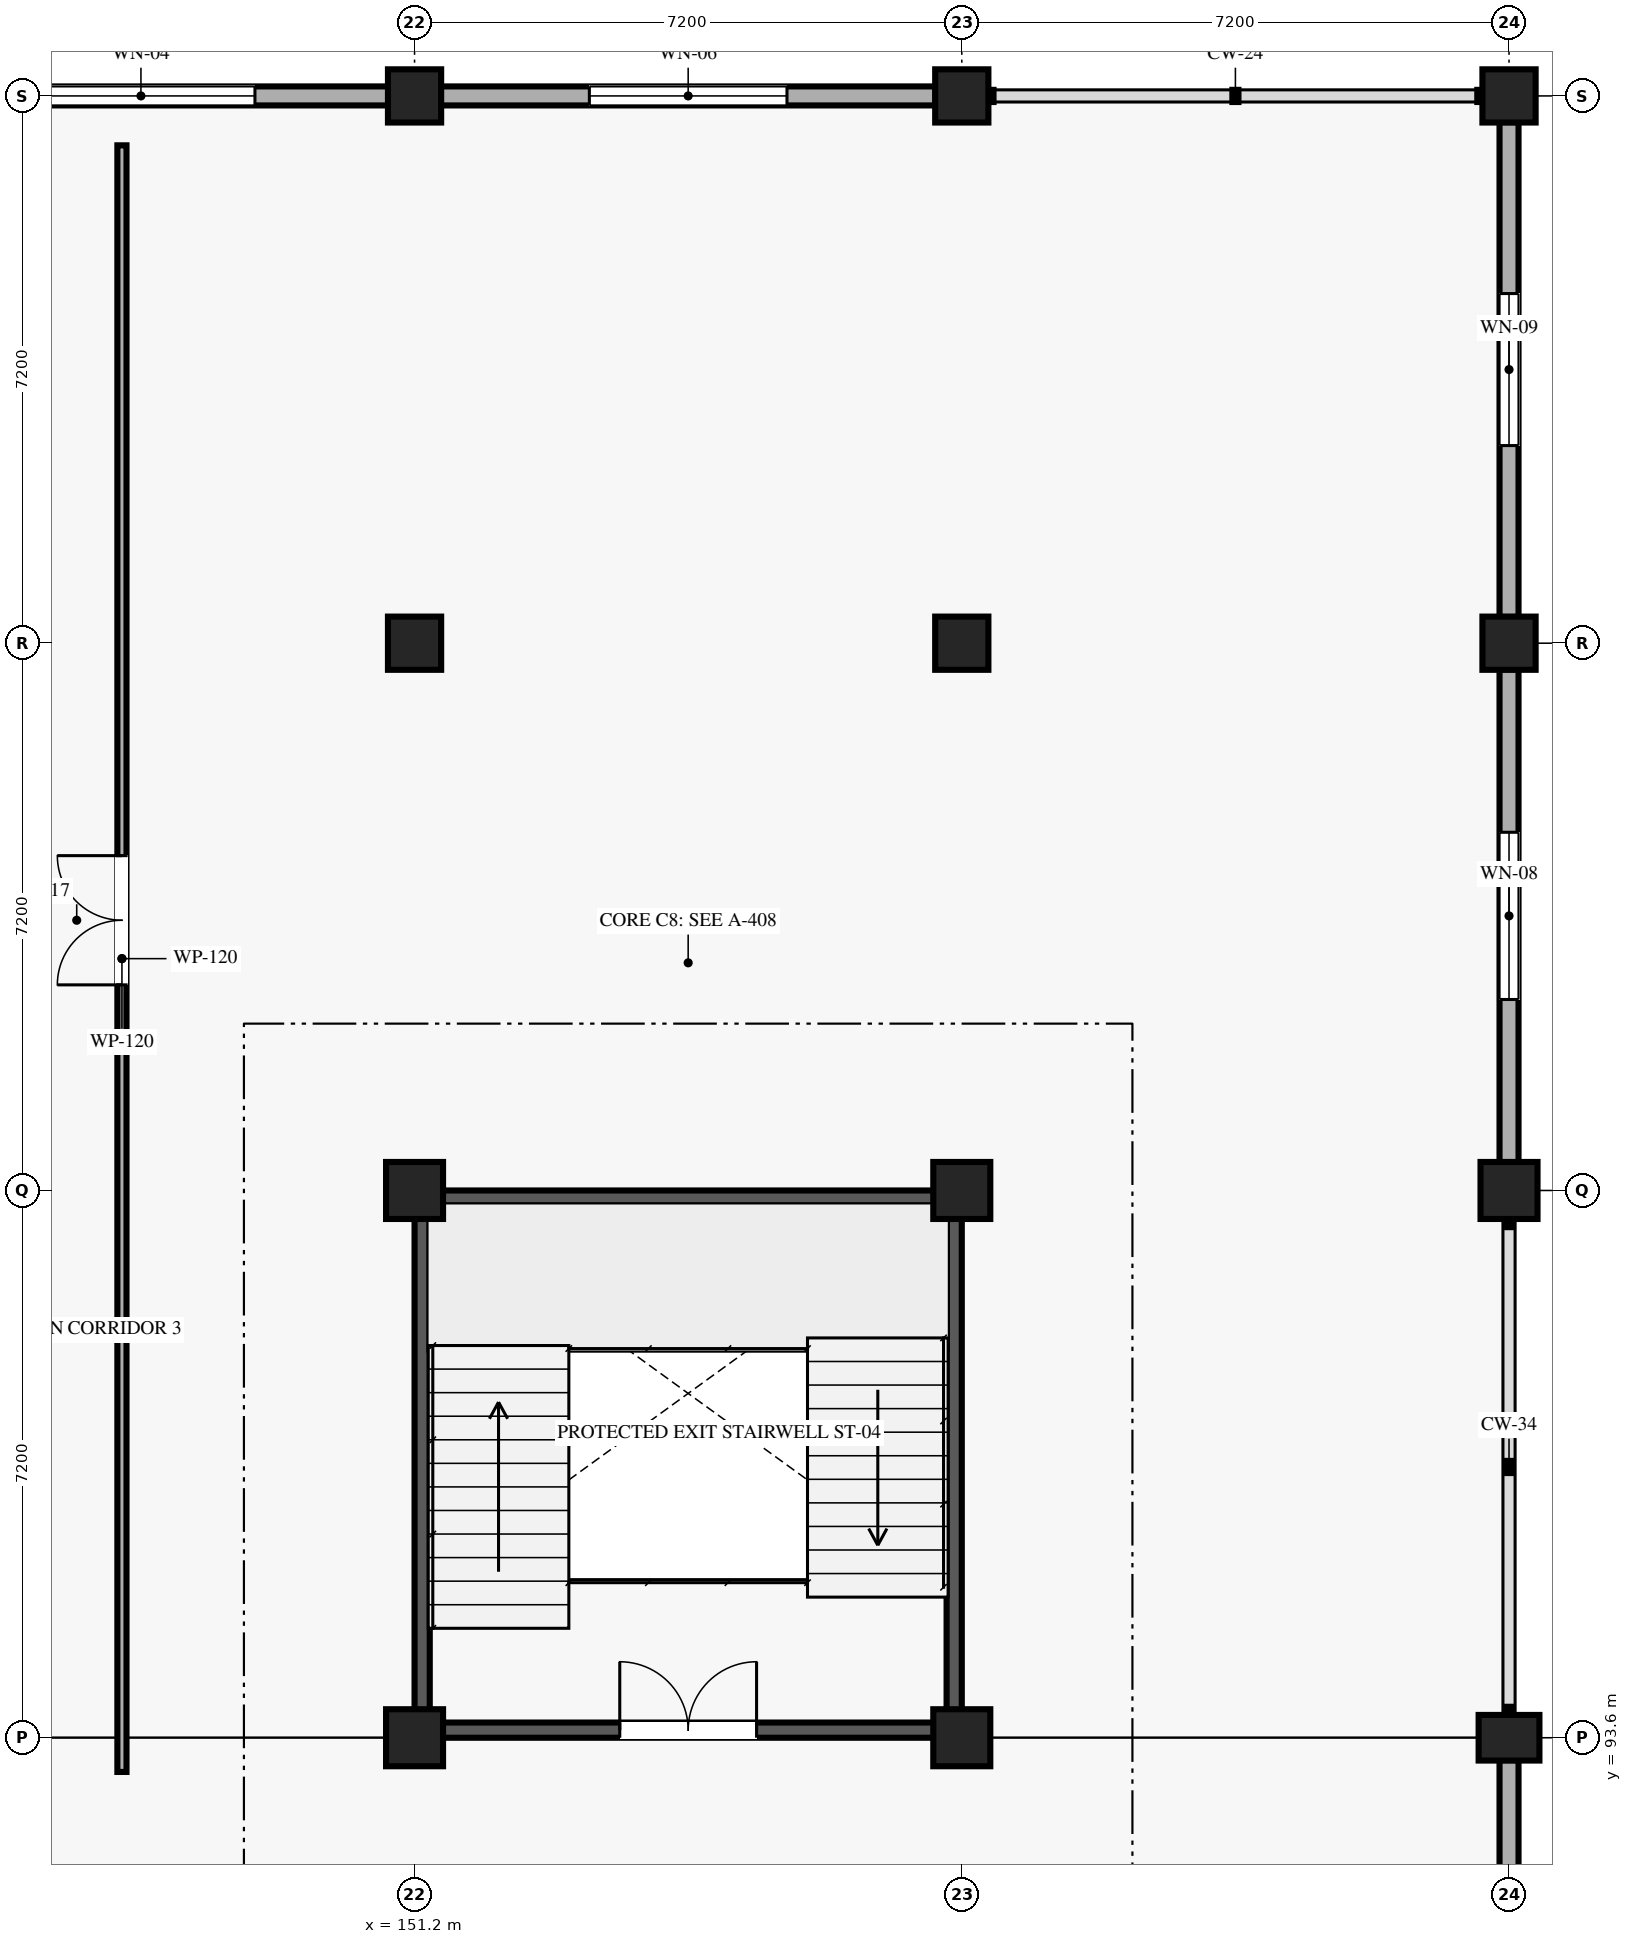
"""IFC4 building model, lengths in metres.
Left out: names, types, materials, properties, quantities, classifications, styles, units other than length and angle.
Written with IfcOpenShell. Run it as: python <this file> out.ifc"""

import sys

from ifc_helpers import new_model, si_unit, direction, frame, frame_2d, origin, origin_2d, place, context, subcontext, project, spatial, rectangle, extrude, element, fill, save


model = new_model("IFC4")
c1 = context("Model", 3, precision=1e-05, world=origin(), true_north=direction((0.0, 1.0)))
c2 = subcontext(c1, "Body", "Model", "MODEL_VIEW")
j1 = project(units=[si_unit("LENGTHUNIT", "METRE"), si_unit("PLANEANGLEUNIT", "RADIAN")], contexts=[c1])
p1 = place(None, origin())
s1 = spatial("IfcSite", under=j1, at=p1, CompositionType="ELEMENT")
p2 = place(p1, origin())
s2 = spatial("IfcBuilding", under=s1, at=p2, CompositionType="ELEMENT")
p3 = place(p2, frame((0.0, 0.0, 9.45)))
s3 = spatial("IfcBuildingStorey", under=s2, at=p3, CompositionType="ELEMENT", Elevation=9.45)
for number, where, z_axis, x_axis in (
    (1, (151.2, 93.6, 0.0), (0.0, 0.0, 1.0), (1.0, 0.0, 0.0)),
    (2, (151.2, 100.8, 0.0), (0.0, 0.0, 1.0), (1.0, 0.0, 0.0)),
):
    element("IfcColumn", number, at=place(p3, frame(where, z_axis=z_axis, x_axis=x_axis)), inside=s3, PredefinedType="COLUMN", context=c2, shape_type="SweptSolid", body=[
        extrude(rectangle(XDim=0.75, YDim=0.75, at=origin_2d()), origin(), (0.0, 0.0, 1.0), 4.05),
    ])
for number, where, z_axis, x_axis in (
    (3, (151.2, 108.0, 0.0), (0.0, 0.0, 1.0), (1.0, 0.0, 0.0)),
    (4, (151.2, 115.2, 0.0), (0.0, 0.0, 1.0), (1.0, 0.0, 0.0)),
):
    element("IfcColumn", number, at=place(p3, frame(where, z_axis=z_axis, x_axis=x_axis)), inside=s3, PredefinedType="COLUMN", context=c2, shape_type="SweptSolid", body=[
        extrude(rectangle(XDim=0.7, YDim=0.7, at=origin_2d()), origin(), (0.0, 0.0, 1.0), 4.05),
    ])
for number, where, z_axis, x_axis in (
    (5, (158.4, 93.6, 0.0), (0.0, 0.0, 1.0), (1.0, 0.0, 0.0)),
    (6, (158.4, 100.8, 0.0), (0.0, 0.0, 1.0), (1.0, 0.0, 0.0)),
):
    element("IfcColumn", number, at=place(p3, frame(where, z_axis=z_axis, x_axis=x_axis)), inside=s3, PredefinedType="COLUMN", context=c2, shape_type="SweptSolid", body=[
        extrude(rectangle(XDim=0.75, YDim=0.75, at=origin_2d()), origin(), (0.0, 0.0, 1.0), 4.05),
    ])
for number, where, z_axis, x_axis in (
    (7, (158.4, 108.0, 0.0), (0.0, 0.0, 1.0), (1.0, 0.0, 0.0)),
    (8, (158.4, 115.2, 0.0), (0.0, 0.0, 1.0), (1.0, 0.0, 0.0)),
):
    element("IfcColumn", number, at=place(p3, frame(where, z_axis=z_axis, x_axis=x_axis)), inside=s3, PredefinedType="COLUMN", context=c2, shape_type="SweptSolid", body=[
        extrude(rectangle(XDim=0.7, YDim=0.7, at=origin_2d()), origin(), (0.0, 0.0, 1.0), 4.05),
    ])
p4 = place(p3, frame((165.6, 93.6, 0.0), z_axis=(0.0, 0.0, 1.0), x_axis=(0.0, 1.0, 0.0)))
e9 = element("IfcColumn", 9, at=p4, inside=s3, PredefinedType="COLUMN", context=c2, shape_type="SweptSolid", body=[
    extrude(rectangle(XDim=0.6, YDim=0.8, at=origin_2d()), origin(), (0.0, 0.0, 1.0), 4.05),
])
p5 = place(p3, frame((165.6, 100.8, 0.0), z_axis=(0.0, 0.0, 1.0), x_axis=(1.0, 0.0, 0.0)))
e10 = element("IfcColumn", 10, at=p5, inside=s3, PredefinedType="COLUMN", context=c2, shape_type="SweptSolid", body=[
    extrude(rectangle(XDim=0.75, YDim=0.75, at=origin_2d()), origin(), (0.0, 0.0, 1.0), 4.05),
])
for number, where, z_axis, x_axis in (
    (11, (165.6, 108.0, 0.0), (0.0, 0.0, 1.0), (1.0, 0.0, 0.0)),
    (12, (165.6, 115.2, 0.0), (0.0, 0.0, 1.0), (1.0, 0.0, 0.0)),
):
    element("IfcColumn", number, at=place(p3, frame(where, z_axis=z_axis, x_axis=x_axis)), inside=s3, PredefinedType="COLUMN", context=c2, shape_type="SweptSolid", body=[
        extrude(rectangle(XDim=0.7, YDim=0.7, at=origin_2d()), origin(), (0.0, 0.0, 1.0), 4.05),
    ])
p6 = place(p3, frame((144.345, 115.2, 0.0), z_axis=(0.0, 0.0, 1.0), x_axis=(1.0, 0.0, 0.0)))
e13 = element("IfcWall", 13, at=p6, inside=s3, PredefinedType="SOLIDWALL", context=c2, shape_type="SweptSolid", body=[
    extrude(rectangle(XDim=6.51, YDim=0.25, at=frame_2d((3.255, 0.0))), origin(), (0.0, 0.0, 1.0), 3.195),
])
p7 = place(p6, frame((1.755, 0.0, 0.85)))
e14 = element("IfcOpeningElement", 14, at=p7, cuts=e13, PredefinedType="OPENING", context=c2, shape_type="SweptSolid", body=[
    extrude(rectangle(XDim=3.0, YDim=1.9, at=frame_2d((1.5, 0.95))), frame((0.0, 0.135, 0.0), z_axis=(0.0, -1.0, 0.0), x_axis=(1.0, 0.0, 0.0)), (0.0, 0.0, 1.0), 0.27),
])
p8 = place(p3, frame((151.545, 115.2, 0.0), z_axis=(0.0, 0.0, 1.0), x_axis=(1.0, 0.0, 0.0)))
e15 = element("IfcWall", 15, at=p8, inside=s3, PredefinedType="SOLIDWALL", context=c2, shape_type="SweptSolid", body=[
    extrude(rectangle(XDim=6.51, YDim=0.25, at=frame_2d((3.255, 0.0))), origin(), (0.0, 0.0, 1.0), 3.195),
])
p9 = place(p8, frame((1.955, 0.0, 0.85)))
e16 = element("IfcOpeningElement", 16, at=p9, cuts=e15, PredefinedType="OPENING", context=c2, shape_type="SweptSolid", body=[
    extrude(rectangle(XDim=2.6, YDim=1.8, at=frame_2d((1.3, 0.9))), frame((0.0, 0.135, 0.0), z_axis=(0.0, -1.0, 0.0), x_axis=(1.0, 0.0, 0.0)), (0.0, 0.0, 1.0), 0.27),
])
p10 = place(p3, frame((165.6, 86.695, 0.0), z_axis=(0.0, 0.0, 1.0), x_axis=(0.0, 1.0, 0.0)))
e17 = element("IfcWall", 17, at=p10, inside=s3, PredefinedType="SOLIDWALL", context=c2, shape_type="SweptSolid", body=[
    extrude(rectangle(XDim=6.61, YDim=0.25, at=frame_2d((3.305, 0.0))), origin(), (0.0, 0.0, 1.0), 3.195),
])
p11 = place(p10, frame((2.005, 0.0, 0.85)))
e18 = element("IfcOpeningElement", 18, at=p11, cuts=e17, PredefinedType="OPENING", context=c2, shape_type="SweptSolid", body=[
    extrude(rectangle(XDim=2.6, YDim=1.8, at=frame_2d((1.3, 0.9))), frame((0.0, 0.135, 0.0), z_axis=(0.0, -1.0, 0.0), x_axis=(1.0, 0.0, 0.0)), (0.0, 0.0, 1.0), 0.27),
])
p12 = place(p3, frame((165.6, 101.17, 0.0), z_axis=(0.0, 0.0, 1.0), x_axis=(0.0, 1.0, 0.0)))
e19 = element("IfcWall", 19, at=p12, inside=s3, PredefinedType="SOLIDWALL", context=c2, shape_type="SweptSolid", body=[
    extrude(rectangle(XDim=6.485, YDim=0.25, at=frame_2d((3.243, 0.0))), origin(), (0.0, 0.0, 1.0), 3.195),
])
p13 = place(p12, frame((2.143, 0.0, 0.85)))
e20 = element("IfcOpeningElement", 20, at=p13, cuts=e19, PredefinedType="OPENING", context=c2, shape_type="SweptSolid", body=[
    extrude(rectangle(XDim=2.2, YDim=1.7, at=frame_2d((1.1, 0.85))), frame((0.0, 0.135, 0.0), z_axis=(0.0, -1.0, 0.0), x_axis=(1.0, 0.0, 0.0)), (0.0, 0.0, 1.0), 0.27),
])
p14 = place(p3, frame((165.6, 108.345, 0.0), z_axis=(0.0, 0.0, 1.0), x_axis=(0.0, 1.0, 0.0)))
e21 = element("IfcWall", 21, at=p14, inside=s3, PredefinedType="SOLIDWALL", context=c2, shape_type="SweptSolid", body=[
    extrude(rectangle(XDim=6.51, YDim=0.25, at=frame_2d((3.255, 0.0))), origin(), (0.0, 0.0, 1.0), 3.195),
])
p15 = place(p14, frame((2.255, 0.0, 0.85)))
e22 = element("IfcOpeningElement", 22, at=p15, cuts=e21, PredefinedType="OPENING", context=c2, shape_type="SweptSolid", body=[
    extrude(rectangle(XDim=2.0, YDim=1.65, at=frame_2d((1.0, 0.825))), frame((0.0, 0.135, 0.0), z_axis=(0.0, -1.0, 0.0), x_axis=(1.0, 0.0, 0.0)), (0.0, 0.0, 1.0), 0.27),
])
p16 = place(p3, frame((151.4, 93.7, 0.0), z_axis=(0.0, 0.0, 1.0), x_axis=(1.0, 0.0, 0.0)))
e23 = element("IfcWall", 23, at=p16, inside=s3, PredefinedType="SHEAR", context=c2, shape_type="SweptSolid", body=[
    extrude(rectangle(XDim=6.8, YDim=0.2, at=frame_2d((3.4, 0.0))), origin(), (0.0, 0.0, 1.0), 3.81),
])
p17 = place(p16, frame((2.5, 0.0, 0.0)))
e24 = element("IfcOpeningElement", 24, at=p17, cuts=e23, PredefinedType="OPENING", context=c2, shape_type="SweptSolid", body=[
    extrude(rectangle(XDim=1.8, YDim=2.2, at=frame_2d((0.9, 1.1))), frame((0.0, 0.11, 0.0), z_axis=(0.0, -1.0, 0.0), x_axis=(1.0, 0.0, 0.0)), (0.0, 0.0, 1.0), 0.22),
])
for number, where, z_axis, x_axis in (
    (25, (151.4, 100.7, 0.0), (0.0, 0.0, 1.0), (1.0, 0.0, 0.0)),
    (26, (151.3, 93.8, 0.0), (0.0, 0.0, 1.0), (0.0, 1.0, 0.0)),
    (27, (158.3, 93.8, 0.0), (0.0, 0.0, 1.0), (0.0, 1.0, 0.0)),
):
    element("IfcWall", number, at=place(p3, frame(where, z_axis=z_axis, x_axis=x_axis)), inside=s3, PredefinedType="SHEAR", context=c2, shape_type="SweptSolid", body=[
        extrude(rectangle(XDim=6.8, YDim=0.2, at=frame_2d((3.4, 0.0))), origin(), (0.0, 0.0, 1.0), 3.81),
    ])
p18 = place(p3, frame((147.35, 93.15, 0.0), z_axis=(0.0, 0.0, 1.0), x_axis=(0.0, 1.0, 0.0)))
e28 = element("IfcWall", 28, at=p18, inside=s3, PredefinedType="PARTITIONING", context=c2, shape_type="SweptSolid", body=[
    extrude(rectangle(XDim=21.4, YDim=0.12, at=frame_2d((10.7, 0.0))), origin(), (0.0, 0.0, 1.0), 3.81),
])
p19 = place(p18, frame((10.355, 0.0, 0.0)))
e29 = element("IfcOpeningElement", 29, at=p19, cuts=e28, PredefinedType="OPENING", context=c2, shape_type="SweptSolid", body=[
    extrude(rectangle(XDim=1.7, YDim=2.2, at=frame_2d((0.85, 1.1))), frame((0.0, 0.07, 0.0), z_axis=(0.0, -1.0, 0.0), x_axis=(1.0, 0.0, 0.0)), (0.0, 0.0, 1.0), 0.14),
])
p20 = place(p7, origin())
e30 = element("IfcWindow", 30, at=p20, inside=s3, PartitioningType="SINGLE_PANEL", PredefinedType="WINDOW", context=c2, shape_type="SweptSolid", body=[
    extrude(rectangle(XDim=3.0, YDim=1.9, at=frame_2d((1.5, 0.95))), frame((0.0, 0.03, 0.0), z_axis=(0.0, -1.0, 0.0), x_axis=(1.0, 0.0, 0.0)), (0.0, 0.0, 1.0), 0.06),
])
fill(e14, e30)
p21 = place(p9, origin())
e31 = element("IfcWindow", 31, at=p21, inside=s3, PartitioningType="SINGLE_PANEL", PredefinedType="WINDOW", context=c2, shape_type="SweptSolid", body=[
    extrude(rectangle(XDim=2.6, YDim=1.8, at=frame_2d((1.3, 0.9))), frame((0.0, 0.03, 0.0), z_axis=(0.0, -1.0, 0.0), x_axis=(1.0, 0.0, 0.0)), (0.0, 0.0, 1.0), 0.06),
])
fill(e16, e31)
p22 = place(p13, origin())
e32 = element("IfcWindow", 32, at=p22, inside=s3, PartitioningType="SINGLE_PANEL", PredefinedType="WINDOW", context=c2, shape_type="SweptSolid", body=[
    extrude(rectangle(XDim=2.2, YDim=1.7, at=frame_2d((1.1, 0.85))), frame((0.0, 0.03, 0.0), z_axis=(0.0, -1.0, 0.0), x_axis=(1.0, 0.0, 0.0)), (0.0, 0.0, 1.0), 0.06),
])
fill(e20, e32)
p23 = place(p15, origin())
e33 = element("IfcWindow", 33, at=p23, inside=s3, PartitioningType="SINGLE_PANEL", PredefinedType="WINDOW", context=c2, shape_type="SweptSolid", body=[
    extrude(rectangle(XDim=2.0, YDim=1.65, at=frame_2d((1.0, 0.825))), frame((0.0, 0.03, 0.0), z_axis=(0.0, -1.0, 0.0), x_axis=(1.0, 0.0, 0.0)), (0.0, 0.0, 1.0), 0.06),
])
fill(e22, e33)
p24 = place(p17, origin())
e34 = element("IfcDoor", 34, at=p24, inside=s3, OperationType="DOUBLE_DOOR_SINGLE_SWING", PredefinedType="DOOR", context=c2, shape_type="SweptSolid", body=[
    extrude(rectangle(XDim=1.8, YDim=2.2, at=frame_2d((0.9, 1.1))), frame((0.0, 0.025, 0.0), z_axis=(0.0, -1.0, 0.0), x_axis=(1.0, 0.0, 0.0)), (0.0, 0.0, 1.0), 0.05),
])
fill(e24, e34)
p25 = place(p19, origin())
e35 = element("IfcDoor", 35, at=p25, inside=s3, OperationType="DOUBLE_DOOR_SINGLE_SWING", PredefinedType="DOOR", context=c2, shape_type="SweptSolid", body=[
    extrude(rectangle(XDim=1.7, YDim=2.2, at=frame_2d((0.85, 1.1))), frame((0.0, 0.025, 0.0), z_axis=(0.0, -1.0, 0.0), x_axis=(1.0, 0.0, 0.0)), (0.0, 0.0, 1.0), 0.05),
])
fill(e29, e35)
save(model, sys.argv[1])
